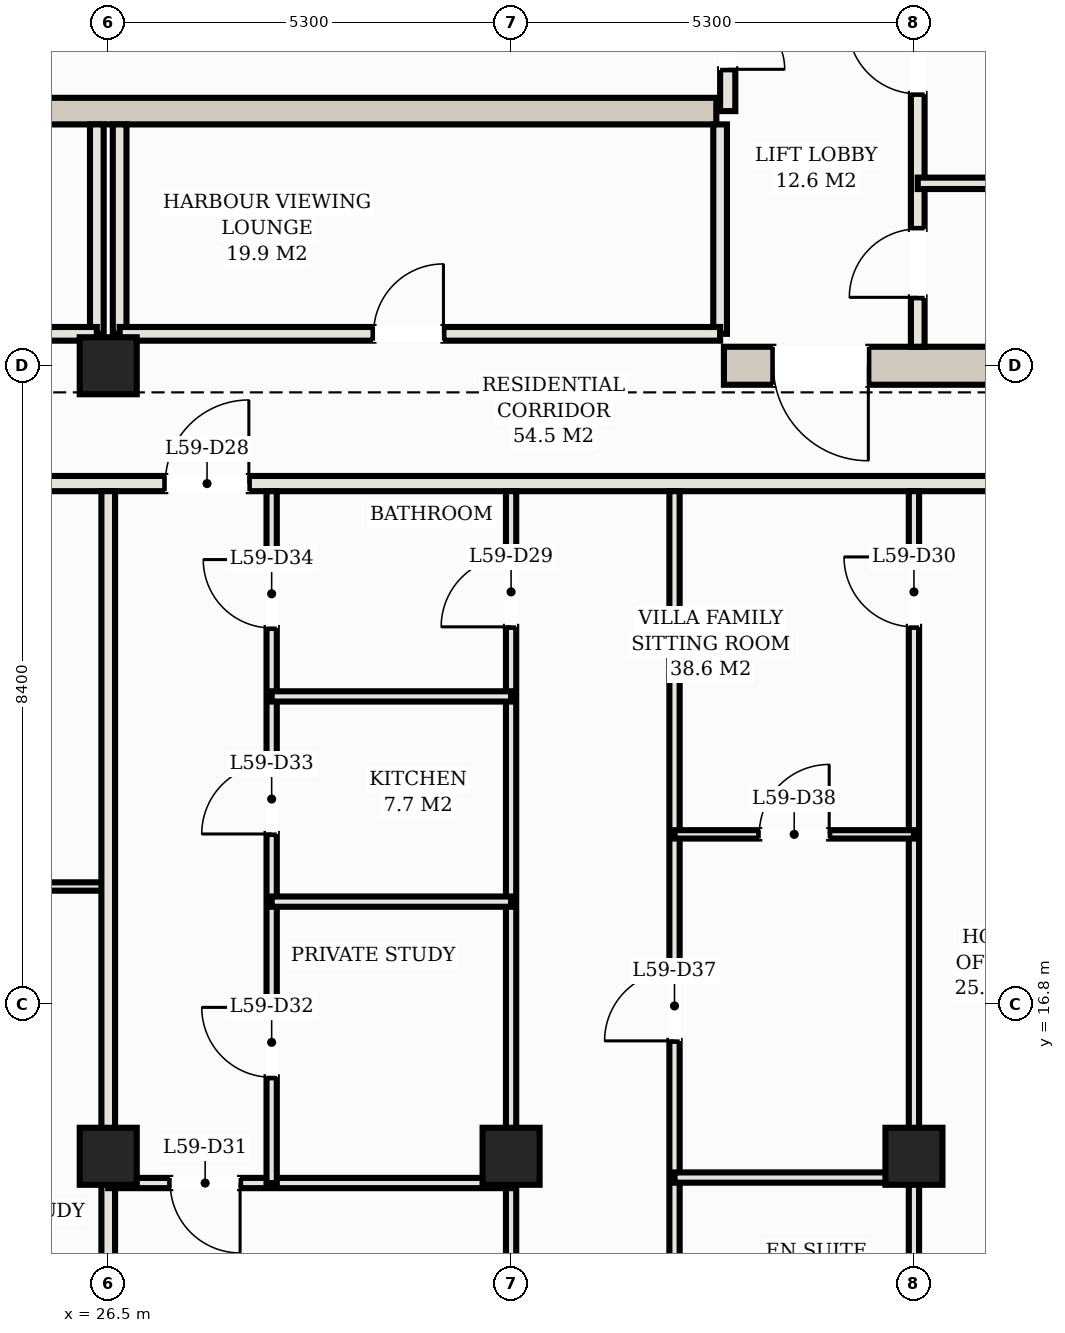
"""IFC4 building model, lengths in metres.
Left out: names, types, materials, properties, quantities, classifications, styles, units other than length and angle.
Written with IfcOpenShell. Run it as: python <this file> out.ifc"""

import sys

from ifc_helpers import new_model, si_unit, direction, frame, frame_2d, origin, origin_2d, place, context, subcontext, project, spatial, rectangle, hollow_rectangle, extrude, element, fill, save


model = new_model("IFC4")
c1 = context("Model", 3, precision=1e-05, world=origin(), true_north=direction((0.0, 1.0)))
c2 = subcontext(c1, "Body", "Model", "MODEL_VIEW")
j1 = project(units=[si_unit("LENGTHUNIT", "METRE"), si_unit("PLANEANGLEUNIT", "RADIAN")], contexts=[c1])
p1 = place(None, origin())
s1 = spatial("IfcSite", under=j1, at=p1, CompositionType="ELEMENT")
p2 = place(p1, origin())
s2 = spatial("IfcBuilding", under=s1, at=p2, CompositionType="ELEMENT")
p3 = place(p2, frame((0.0, 0.0, 216.5)))
s3 = spatial("IfcBuildingStorey", under=s2, at=p3, CompositionType="ELEMENT", Elevation=216.5)
p4 = place(p3, frame((34.6, 25.2, 0.0), z_axis=(0.0, 0.0, 1.0), x_axis=(1.0, 0.0, 0.0)))
e1 = element("IfcWall", 1, at=p4, inside=s3, PredefinedType="SHEAR", context=c2, shape_type="SweptSolid", body=[
    extrude(rectangle(XDim=8.05, YDim=0.5, at=frame_2d((4.025, 0.0))), origin(), (0.0, 0.0, 1.0), 3.11),
])
p5 = place(p4, frame((0.65, 0.0, 0.0)))
e2 = element("IfcOpeningElement", 2, at=p5, cuts=e1, PredefinedType="OPENING", context=c2, shape_type="SweptSolid", body=[
    extrude(rectangle(XDim=1.25, YDim=2.2, at=frame_2d((0.625, 1.1))), frame((0.0, 0.26, 0.0), z_axis=(0.0, -1.0, 0.0), x_axis=(1.0, 0.0, 0.0)), (0.0, 0.0, 1.0), 0.52),
])
p6 = place(p3, frame((18.5, 28.55, 0.0), z_axis=(0.0, 0.0, 1.0), x_axis=(1.0, 0.0, 0.0)))
e3 = element("IfcWall", 3, at=p6, inside=s3, PredefinedType="SHEAR", context=c2, shape_type="SweptSolid", body=[
    extrude(rectangle(XDim=16.0, YDim=0.35, at=frame_2d((8.0, 0.0))), origin(), (0.0, 0.0, 1.0), 3.11),
])
for number, where, z_axis, x_axis in (
    (4, (26.5, 25.2, 0.0), (0.0, 0.0, 1.0), (1.0, 0.0, 0.0)),
    (5, (26.5, 14.8, 0.0), (0.0, 0.0, 1.0), (1.0, 0.0, 0.0)),
    (6, (31.8, 14.8, 0.0), (0.0, 0.0, 1.0), (1.0, 0.0, 0.0)),
    (7, (37.1, 14.8, 0.0), (0.0, 0.0, 1.0), (1.0, 0.0, 0.0)),
):
    element("IfcColumn", number, at=place(p3, frame(where, z_axis=z_axis, x_axis=x_axis)), inside=s3, PredefinedType="COLUMN", context=c2, shape_type="SweptSolid", body=[
        extrude(hollow_rectangle(XDim=0.75, YDim=0.75, WallThickness=0.025, at=origin_2d()), origin(), (0.0, 0.0, 1.0), 3.3),
    ])
p7 = place(p3, frame((37.15, 25.45, 0.0), z_axis=(0.0, 0.0, 1.0), x_axis=(0.0, 1.0, 0.0)))
e8 = element("IfcWall", 8, at=p7, inside=s3, PredefinedType="PARTITIONING", context=c2, shape_type="SweptSolid", body=[
    extrude(rectangle(XDim=5.475, YDim=0.18, at=frame_2d((2.738, 0.0))), origin(), (0.0, 0.0, 1.0), 2.43),
])
p8 = place(p7, frame((0.65, 0.0, 0.0)))
e9 = element("IfcOpeningElement", 9, at=p8, cuts=e8, PredefinedType="OPENING", context=c2, shape_type="SweptSolid", body=[
    extrude(rectangle(XDim=0.9, YDim=2.15, at=frame_2d((0.45, 1.075))), frame((0.0, 0.1, 0.0), z_axis=(0.0, -1.0, 0.0), x_axis=(1.0, 0.0, 0.0)), (0.0, 0.0, 1.0), 0.2),
])
p9 = place(p7, frame((3.327, 0.0, 0.0)))
e10 = element("IfcOpeningElement", 10, at=p9, cuts=e8, PredefinedType="OPENING", context=c2, shape_type="SweptSolid", body=[
    extrude(rectangle(XDim=0.92, YDim=2.15, at=frame_2d((0.46, 1.075))), frame((0.0, 0.1, 0.0), z_axis=(0.0, -1.0, 0.0), x_axis=(1.0, 0.0, 0.0)), (0.0, 0.0, 1.0), 0.2),
])
p10 = place(p3, frame((37.15, 27.6, 0.0), z_axis=(0.0, 0.0, 1.0), x_axis=(1.0, 0.0, 0.0)))
e11 = element("IfcWall", 11, at=p10, inside=s3, PredefinedType="PARTITIONING", context=c2, shape_type="SweptSolid", body=[
    extrude(rectangle(XDim=5.0, YDim=0.15, at=frame_2d((2.5, 0.0))), origin(), (0.0, 0.0, 1.0), 2.43),
])
p11 = place(p3, frame((34.65, 28.55, 0.0), z_axis=(0.0, 0.0, 1.0), x_axis=(0.0, 1.0, 0.0)))
e12 = element("IfcWall", 12, at=p11, inside=s3, PredefinedType="PARTITIONING", context=c2, shape_type="SweptSolid", body=[
    extrude(rectangle(XDim=2.6, YDim=0.2, at=frame_2d((1.3, 0.0))), origin(), (0.0, 0.0, 1.0), 2.43),
])
p12 = place(p11, frame((0.55, 0.0, 0.0)))
e13 = element("IfcOpeningElement", 13, at=p12, cuts=e12, PredefinedType="OPENING", context=c2, shape_type="SweptSolid", body=[
    extrude(rectangle(XDim=1.5, YDim=2.25, at=frame_2d((0.75, 1.125))), frame((0.0, 0.11, 0.0), z_axis=(0.0, -1.0, 0.0), x_axis=(1.0, 0.0, 0.0)), (0.0, 0.0, 1.0), 0.22),
])
p13 = place(p3, frame((26.35, 25.62, 0.0), z_axis=(0.0, 0.0, 1.0), x_axis=(0.0, 1.0, 0.0)))
e14 = element("IfcWall", 14, at=p13, inside=s3, PredefinedType="PARTITIONING", context=c2, shape_type="SweptSolid", body=[
    extrude(rectangle(XDim=2.755, YDim=0.18, at=frame_2d((1.377, 0.0))), origin(), (0.0, 0.0, 1.0), 2.43),
])
p14 = place(p3, frame((18.45, 25.62, 0.0), z_axis=(0.0, 0.0, 1.0), x_axis=(1.0, 0.0, 0.0)))
e15 = element("IfcWall", 15, at=p14, inside=s3, PredefinedType="PARTITIONING", context=c2, shape_type="SweptSolid", body=[
    extrude(rectangle(XDim=7.9, YDim=0.18, at=frame_2d((3.95, 0.0))), origin(), (0.0, 0.0, 1.0), 2.43),
])
p15 = place(p14, frame((3.34, 0.0, 0.0)))
e16 = element("IfcOpeningElement", 16, at=p15, cuts=e15, PredefinedType="OPENING", context=c2, shape_type="SweptSolid", body=[
    extrude(rectangle(XDim=0.92, YDim=2.15, at=frame_2d((0.46, 1.075))), frame((0.0, 0.1, 0.0), z_axis=(0.0, -1.0, 0.0), x_axis=(1.0, 0.0, 0.0)), (0.0, 0.0, 1.0), 0.2),
])
for number, where, z_axis, x_axis in (
    (17, (26.65, 25.62, 0.0), (0.0, 0.0, 1.0), (0.0, 1.0, 0.0)),
    (18, (34.55, 25.62, 0.0), (0.0, 0.0, 1.0), (0.0, 1.0, 0.0)),
):
    element("IfcWall", number, at=place(p3, frame(where, z_axis=z_axis, x_axis=x_axis)), inside=s3, PredefinedType="PARTITIONING", context=c2, shape_type="SweptSolid", body=[
        extrude(rectangle(XDim=2.755, YDim=0.18, at=frame_2d((1.377, 0.0))), origin(), (0.0, 0.0, 1.0), 2.43),
    ])
p16 = place(p3, frame((26.65, 25.62, 0.0), z_axis=(0.0, 0.0, 1.0), x_axis=(1.0, 0.0, 0.0)))
e19 = element("IfcWall", 19, at=p16, inside=s3, PredefinedType="PARTITIONING", context=c2, shape_type="SweptSolid", body=[
    extrude(rectangle(XDim=7.9, YDim=0.18, at=frame_2d((3.95, 0.0))), origin(), (0.0, 0.0, 1.0), 2.43),
])
p17 = place(p16, frame((3.34, 0.0, 0.0)))
e20 = element("IfcOpeningElement", 20, at=p17, cuts=e19, PredefinedType="OPENING", context=c2, shape_type="SweptSolid", body=[
    extrude(rectangle(XDim=0.92, YDim=2.15, at=frame_2d((0.46, 1.075))), frame((0.0, 0.1, 0.0), z_axis=(0.0, -1.0, 0.0), x_axis=(1.0, 0.0, 0.0)), (0.0, 0.0, 1.0), 0.2),
])
p18 = place(p3, frame((6.72, 23.65, 0.0), z_axis=(0.0, 0.0, 1.0), x_axis=(1.0, 0.0, 0.0)))
e21 = element("IfcWall", 21, at=p18, inside=s3, PredefinedType="PARTITIONING", context=c2, shape_type="SweptSolid", body=[
    extrude(rectangle(XDim=39.56, YDim=0.2, at=frame_2d((19.78, 0.0))), origin(), (0.0, 0.0, 1.0), 2.43),
])
p19 = place(p18, frame((4.63, 0.0, 0.0)))
e22 = element("IfcOpeningElement", 22, at=p19, cuts=e21, PredefinedType="OPENING", context=c2, shape_type="SweptSolid", body=[
    extrude(rectangle(XDim=1.1, YDim=2.25, at=frame_2d((0.55, 1.125))), frame((0.0, 0.11, 0.0), z_axis=(0.0, -1.0, 0.0), x_axis=(1.0, 0.0, 0.0)), (0.0, 0.0, 1.0), 0.22),
])
p20 = place(p18, frame((20.53, 0.0, 0.0)))
e23 = element("IfcOpeningElement", 23, at=p20, cuts=e21, PredefinedType="OPENING", context=c2, shape_type="SweptSolid", body=[
    extrude(rectangle(XDim=1.1, YDim=2.25, at=frame_2d((0.55, 1.125))), frame((0.0, 0.11, 0.0), z_axis=(0.0, -1.0, 0.0), x_axis=(1.0, 0.0, 0.0)), (0.0, 0.0, 1.0), 0.22),
])
p21 = place(p18, frame((2.085, 0.0, 0.0)))
e24 = element("IfcOpeningElement", 24, at=p21, cuts=e21, PredefinedType="OPENING", context=c2, shape_type="SweptSolid", body=[
    extrude(rectangle(XDim=0.92, YDim=2.15, at=frame_2d((0.46, 1.075))), frame((0.0, 0.11, 0.0), z_axis=(0.0, -1.0, 0.0), x_axis=(1.0, 0.0, 0.0)), (0.0, 0.0, 1.0), 0.22),
])
p22 = place(p18, frame((36.555, 0.0, 0.0)))
e25 = element("IfcOpeningElement", 25, at=p22, cuts=e21, PredefinedType="OPENING", context=c2, shape_type="SweptSolid", body=[
    extrude(rectangle(XDim=0.92, YDim=2.15, at=frame_2d((0.46, 1.075))), frame((0.0, 0.11, 0.0), z_axis=(0.0, -1.0, 0.0), x_axis=(1.0, 0.0, 0.0)), (0.0, 0.0, 1.0), 0.22),
])
p23 = place(p3, frame((23.35, 18.349, 0.0), z_axis=(0.0, 0.0, 1.0), x_axis=(1.0, 0.0, 0.0)))
e26 = element("IfcWall", 26, at=p23, inside=s3, PredefinedType="MOVABLE", context=c2, shape_type="SweptSolid", body=[
    extrude(rectangle(XDim=3.15, YDim=0.11, at=frame_2d((1.575, 0.0))), origin(), (0.0, 0.0, 1.0), 2.43),
])
p24 = place(p23, frame((1.115, 0.0, 0.0)))
e27 = element("IfcOpeningElement", 27, at=p24, cuts=e26, PredefinedType="OPENING", context=c2, shape_type="SweptSolid", body=[
    extrude(rectangle(XDim=0.92, YDim=2.15, at=frame_2d((0.46, 1.075))), frame((0.0, 0.065, 0.0), z_axis=(0.0, -1.0, 0.0), x_axis=(1.0, 0.0, 0.0)), (0.0, 0.0, 1.0), 0.13),
])
p25 = place(p3, frame((26.5, 4.42, 0.0), z_axis=(0.0, 0.0, 1.0), x_axis=(0.0, 1.0, 0.0)))
e28 = element("IfcWall", 28, at=p25, inside=s3, PredefinedType="PARTITIONING", context=c2, shape_type="SweptSolid", body=[
    extrude(rectangle(XDim=19.13, YDim=0.18, at=frame_2d((9.565, 0.0))), origin(), (0.0, 0.0, 1.0), 2.43),
])
p26 = place(p3, frame((31.8, 5.331, 0.0), z_axis=(0.0, 0.0, 1.0), x_axis=(0.0, 1.0, 0.0)))
e29 = element("IfcWall", 29, at=p26, inside=s3, PredefinedType="PARTITIONING", context=c2, shape_type="SweptSolid", body=[
    extrude(rectangle(XDim=18.219, YDim=0.135, at=frame_2d((9.109, 0.0))), origin(), (0.0, 0.0, 1.0), 2.43),
])
p27 = place(p26, frame((16.434, 0.0, 0.0)))
e30 = element("IfcOpeningElement", 30, at=p27, cuts=e29, PredefinedType="OPENING", context=c2, shape_type="SweptSolid", body=[
    extrude(rectangle(XDim=0.92, YDim=2.15, at=frame_2d((0.46, 1.075))), frame((0.0, 0.078, 0.0), z_axis=(0.0, -1.0, 0.0), x_axis=(1.0, 0.0, 0.0)), (0.0, 0.0, 1.0), 0.155),
])
p28 = place(p3, frame((37.1, 6.02, 0.0), z_axis=(0.0, 0.0, 1.0), x_axis=(0.0, 1.0, 0.0)))
e31 = element("IfcWall", 31, at=p28, inside=s3, PredefinedType="PARTITIONING", context=c2, shape_type="SweptSolid", body=[
    extrude(rectangle(XDim=17.53, YDim=0.135, at=frame_2d((8.765, 0.0))), origin(), (0.0, 0.0, 1.0), 2.43),
])
p29 = place(p28, frame((15.745, 0.0, 0.0)))
e32 = element("IfcOpeningElement", 32, at=p29, cuts=e31, PredefinedType="OPENING", context=c2, shape_type="SweptSolid", body=[
    extrude(rectangle(XDim=0.92, YDim=2.15, at=frame_2d((0.46, 1.075))), frame((0.0, 0.078, 0.0), z_axis=(0.0, -1.0, 0.0), x_axis=(1.0, 0.0, 0.0)), (0.0, 0.0, 1.0), 0.155),
])
p30 = place(p3, frame((26.5, 14.448, 0.0), z_axis=(0.0, 0.0, 1.0), x_axis=(1.0, 0.0, 0.0)))
e33 = element("IfcWall", 33, at=p30, inside=s3, PredefinedType="PARTITIONING", context=c2, shape_type="SweptSolid", body=[
    extrude(rectangle(XDim=5.3, YDim=0.135, at=frame_2d((2.65, 0.0))), origin(), (0.0, 0.0, 1.0), 2.43),
])
p31 = place(p30, frame((0.815, 0.0, 0.0)))
e34 = element("IfcOpeningElement", 34, at=p31, cuts=e33, PredefinedType="OPENING", context=c2, shape_type="SweptSolid", body=[
    extrude(rectangle(XDim=0.92, YDim=2.15, at=frame_2d((0.46, 1.075))), frame((0.0, 0.078, 0.0), z_axis=(0.0, -1.0, 0.0), x_axis=(1.0, 0.0, 0.0)), (0.0, 0.0, 1.0), 0.155),
])
p32 = place(p3, frame((28.65, 14.448, 0.0), z_axis=(0.0, 0.0, 1.0), x_axis=(0.0, 1.0, 0.0)))
e35 = element("IfcWall", 35, at=p32, inside=s3, PredefinedType="PARTITIONING", context=c2, shape_type="SweptSolid", body=[
    extrude(rectangle(XDim=9.102, YDim=0.135, at=frame_2d((4.551, 0.0))), origin(), (0.0, 0.0, 1.0), 2.43),
])
p33 = place(p32, frame((1.391, 0.0, 0.0)))
e36 = element("IfcOpeningElement", 36, at=p33, cuts=e35, PredefinedType="OPENING", context=c2, shape_type="SweptSolid", body=[
    extrude(rectangle(XDim=0.92, YDim=2.15, at=frame_2d((0.46, 1.075))), frame((0.0, 0.078, 0.0), z_axis=(0.0, -1.0, 0.0), x_axis=(1.0, 0.0, 0.0)), (0.0, 0.0, 1.0), 0.155),
])
p34 = place(p32, frame((4.592, 0.0, 0.0)))
e37 = element("IfcOpeningElement", 37, at=p34, cuts=e35, PredefinedType="OPENING", context=c2, shape_type="SweptSolid", body=[
    extrude(rectangle(XDim=0.92, YDim=2.15, at=frame_2d((0.46, 1.075))), frame((0.0, 0.078, 0.0), z_axis=(0.0, -1.0, 0.0), x_axis=(1.0, 0.0, 0.0)), (0.0, 0.0, 1.0), 0.155),
])
p35 = place(p32, frame((7.302, 0.0, 0.0)))
e38 = element("IfcOpeningElement", 38, at=p35, cuts=e35, PredefinedType="OPENING", context=c2, shape_type="SweptSolid", body=[
    extrude(rectangle(XDim=0.9, YDim=2.15, at=frame_2d((0.45, 1.075))), frame((0.0, 0.078, 0.0), z_axis=(0.0, -1.0, 0.0), x_axis=(1.0, 0.0, 0.0)), (0.0, 0.0, 1.0), 0.155),
])
for number, where, z_axis, x_axis in (
    (39, (28.65, 18.15, 0.0), (0.0, 0.0, 1.0), (1.0, 0.0, 0.0)),
    (40, (28.65, 20.85, 0.0), (0.0, 0.0, 1.0), (1.0, 0.0, 0.0)),
):
    element("IfcWall", number, at=place(p3, frame(where, z_axis=z_axis, x_axis=x_axis)), inside=s3, PredefinedType="PARTITIONING", context=c2, shape_type="SweptSolid", body=[
        extrude(rectangle(XDim=3.15, YDim=0.135, at=frame_2d((1.575, 0.0))), origin(), (0.0, 0.0, 1.0), 2.43),
    ])
p36 = place(p3, frame((33.95, 11.32, 0.0), z_axis=(0.0, 0.0, 1.0), x_axis=(0.0, 1.0, 0.0)))
e41 = element("IfcWall", 41, at=p36, inside=s3, PredefinedType="PARTITIONING", context=c2, shape_type="SweptSolid", body=[
    extrude(rectangle(XDim=12.23, YDim=0.135, at=frame_2d((6.115, 0.0))), origin(), (0.0, 0.0, 1.0), 2.43),
])
p37 = place(p36, frame((4.998, 0.0, 0.0)))
e42 = element("IfcOpeningElement", 42, at=p37, cuts=e41, PredefinedType="OPENING", context=c2, shape_type="SweptSolid", body=[
    extrude(rectangle(XDim=0.92, YDim=2.15, at=frame_2d((0.46, 1.075))), frame((0.0, 0.078, 0.0), z_axis=(0.0, -1.0, 0.0), x_axis=(1.0, 0.0, 0.0)), (0.0, 0.0, 1.0), 0.155),
])
p38 = place(p3, frame((33.95, 14.52, 0.0), z_axis=(0.0, 0.0, 1.0), x_axis=(1.0, 0.0, 0.0)))
e43 = element("IfcWall", 43, at=p38, inside=s3, PredefinedType="PARTITIONING", context=c2, shape_type="SweptSolid", body=[
    extrude(rectangle(XDim=3.15, YDim=0.135, at=frame_2d((1.575, 0.0))), origin(), (0.0, 0.0, 1.0), 2.43),
])
p39 = place(p3, frame((33.95, 19.035, 0.0), z_axis=(0.0, 0.0, 1.0), x_axis=(1.0, 0.0, 0.0)))
e44 = element("IfcWall", 44, at=p39, inside=s3, PredefinedType="MOVABLE", context=c2, shape_type="SweptSolid", body=[
    extrude(rectangle(XDim=3.15, YDim=0.11, at=frame_2d((1.575, 0.0))), origin(), (0.0, 0.0, 1.0), 2.43),
])
p40 = place(p39, frame((1.115, 0.0, 0.0)))
e45 = element("IfcOpeningElement", 45, at=p40, cuts=e44, PredefinedType="OPENING", context=c2, shape_type="SweptSolid", body=[
    extrude(rectangle(XDim=0.92, YDim=2.15, at=frame_2d((0.46, 1.075))), frame((0.0, 0.065, 0.0), z_axis=(0.0, -1.0, 0.0), x_axis=(1.0, 0.0, 0.0)), (0.0, 0.0, 1.0), 0.13),
])
p41 = place(p5, frame((1.25, 0.0, 0.0), z_axis=(0.0, 0.0, 1.0), x_axis=(-1.0, 0.0, 0.0)))
e46 = element("IfcDoor", 46, at=p41, inside=s3, OperationType="SINGLE_SWING_LEFT", PredefinedType="DOOR", context=c2, shape_type="SweptSolid", body=[
    extrude(rectangle(XDim=1.25, YDim=2.2, at=frame_2d((0.625, 1.1))), frame((0.0, 0.025, 0.0), z_axis=(0.0, -1.0, 0.0), x_axis=(1.0, 0.0, 0.0)), (0.0, 0.0, 1.0), 0.05),
])
fill(e2, e46)
p42 = place(p8, origin())
e47 = element("IfcDoor", 47, at=p42, inside=s3, OperationType="SINGLE_SWING_LEFT", PredefinedType="DOOR", context=c2, shape_type="SweptSolid", body=[
    extrude(rectangle(XDim=0.9, YDim=2.15, at=frame_2d((0.45, 1.075))), frame((0.0, 0.025, 0.0), z_axis=(0.0, -1.0, 0.0), x_axis=(1.0, 0.0, 0.0)), (0.0, 0.0, 1.0), 0.05),
])
fill(e9, e47)
p43 = place(p9, origin())
e48 = element("IfcDoor", 48, at=p43, inside=s3, OperationType="SINGLE_SWING_RIGHT", PredefinedType="DOOR", context=c2, shape_type="SweptSolid", body=[
    extrude(rectangle(XDim=0.92, YDim=2.15, at=frame_2d((0.46, 1.075))), frame((0.0, 0.025, 0.0), z_axis=(0.0, -1.0, 0.0), x_axis=(1.0, 0.0, 0.0)), (0.0, 0.0, 1.0), 0.05),
])
fill(e10, e48)
p44 = place(p12, frame((1.5, 0.0, 0.0), z_axis=(0.0, 0.0, 1.0), x_axis=(-1.0, 0.0, 0.0)))
e49 = element("IfcDoor", 49, at=p44, inside=s3, OperationType="DOUBLE_DOOR_SINGLE_SWING", PredefinedType="DOOR", context=c2, shape_type="SweptSolid", body=[
    extrude(rectangle(XDim=1.5, YDim=2.25, at=frame_2d((0.75, 1.125))), frame((0.0, 0.025, 0.0), z_axis=(0.0, -1.0, 0.0), x_axis=(1.0, 0.0, 0.0)), (0.0, 0.0, 1.0), 0.05),
])
fill(e13, e49)
p45 = place(p17, origin())
e50 = element("IfcDoor", 50, at=p45, inside=s3, OperationType="SINGLE_SWING_RIGHT", PredefinedType="DOOR", context=c2, shape_type="SweptSolid", body=[
    extrude(rectangle(XDim=0.92, YDim=2.15, at=frame_2d((0.46, 1.075))), frame((0.0, 0.025, 0.0), z_axis=(0.0, -1.0, 0.0), x_axis=(1.0, 0.0, 0.0)), (0.0, 0.0, 1.0), 0.05),
])
fill(e20, e50)
p46 = place(p20, origin())
e51 = element("IfcDoor", 51, at=p46, inside=s3, OperationType="SINGLE_SWING_RIGHT", PredefinedType="DOOR", context=c2, shape_type="SweptSolid", body=[
    extrude(rectangle(XDim=1.1, YDim=2.25, at=frame_2d((0.55, 1.125))), frame((0.0, 0.025, 0.0), z_axis=(0.0, -1.0, 0.0), x_axis=(1.0, 0.0, 0.0)), (0.0, 0.0, 1.0), 0.05),
])
fill(e23, e51)
p47 = place(p27, origin())
e52 = element("IfcDoor", 52, at=p47, inside=s3, OperationType="SINGLE_SWING_LEFT", PredefinedType="DOOR", context=c2, shape_type="SweptSolid", body=[
    extrude(rectangle(XDim=0.92, YDim=2.15, at=frame_2d((0.46, 1.075))), frame((0.0, 0.025, 0.0), z_axis=(0.0, -1.0, 0.0), x_axis=(1.0, 0.0, 0.0)), (0.0, 0.0, 1.0), 0.05),
])
fill(e30, e52)
p48 = place(p29, origin())
e53 = element("IfcDoor", 53, at=p48, inside=s3, OperationType="SINGLE_SWING_RIGHT", PredefinedType="DOOR", context=c2, shape_type="SweptSolid", body=[
    extrude(rectangle(XDim=0.92, YDim=2.15, at=frame_2d((0.46, 1.075))), frame((0.0, 0.025, 0.0), z_axis=(0.0, -1.0, 0.0), x_axis=(1.0, 0.0, 0.0)), (0.0, 0.0, 1.0), 0.05),
])
fill(e32, e53)
p49 = place(p31, frame((0.92, 0.0, 0.0), z_axis=(0.0, 0.0, 1.0), x_axis=(-1.0, 0.0, 0.0)))
e54 = element("IfcDoor", 54, at=p49, inside=s3, OperationType="SINGLE_SWING_LEFT", PredefinedType="DOOR", context=c2, shape_type="SweptSolid", body=[
    extrude(rectangle(XDim=0.92, YDim=2.15, at=frame_2d((0.46, 1.075))), frame((0.0, 0.025, 0.0), z_axis=(0.0, -1.0, 0.0), x_axis=(1.0, 0.0, 0.0)), (0.0, 0.0, 1.0), 0.05),
])
fill(e34, e54)
p50 = place(p33, origin())
e55 = element("IfcDoor", 55, at=p50, inside=s3, OperationType="SINGLE_SWING_RIGHT", PredefinedType="DOOR", context=c2, shape_type="SweptSolid", body=[
    extrude(rectangle(XDim=0.92, YDim=2.15, at=frame_2d((0.46, 1.075))), frame((0.0, 0.025, 0.0), z_axis=(0.0, -1.0, 0.0), x_axis=(1.0, 0.0, 0.0)), (0.0, 0.0, 1.0), 0.05),
])
fill(e36, e55)
p51 = place(p34, origin())
e56 = element("IfcDoor", 56, at=p51, inside=s3, OperationType="SINGLE_SWING_LEFT", PredefinedType="DOOR", context=c2, shape_type="SweptSolid", body=[
    extrude(rectangle(XDim=0.92, YDim=2.15, at=frame_2d((0.46, 1.075))), frame((0.0, 0.025, 0.0), z_axis=(0.0, -1.0, 0.0), x_axis=(1.0, 0.0, 0.0)), (0.0, 0.0, 1.0), 0.05),
])
fill(e37, e56)
p52 = place(p35, origin())
e57 = element("IfcDoor", 57, at=p52, inside=s3, OperationType="SINGLE_SWING_RIGHT", PredefinedType="DOOR", context=c2, shape_type="SweptSolid", body=[
    extrude(rectangle(XDim=0.9, YDim=2.15, at=frame_2d((0.45, 1.075))), frame((0.0, 0.025, 0.0), z_axis=(0.0, -1.0, 0.0), x_axis=(1.0, 0.0, 0.0)), (0.0, 0.0, 1.0), 0.05),
])
fill(e38, e57)
p53 = place(p37, origin())
e58 = element("IfcDoor", 58, at=p53, inside=s3, OperationType="SINGLE_SWING_LEFT", PredefinedType="DOOR", context=c2, shape_type="SweptSolid", body=[
    extrude(rectangle(XDim=0.92, YDim=2.15, at=frame_2d((0.46, 1.075))), frame((0.0, 0.025, 0.0), z_axis=(0.0, -1.0, 0.0), x_axis=(1.0, 0.0, 0.0)), (0.0, 0.0, 1.0), 0.05),
])
fill(e42, e58)
p54 = place(p40, origin())
e59 = element("IfcDoor", 59, at=p54, inside=s3, OperationType="SINGLE_SWING_RIGHT", PredefinedType="DOOR", context=c2, shape_type="SweptSolid", body=[
    extrude(rectangle(XDim=0.92, YDim=2.15, at=frame_2d((0.46, 1.075))), frame((0.0, 0.025, 0.0), z_axis=(0.0, -1.0, 0.0), x_axis=(1.0, 0.0, 0.0)), (0.0, 0.0, 1.0), 0.05),
])
fill(e45, e59)
save(model, sys.argv[1])
